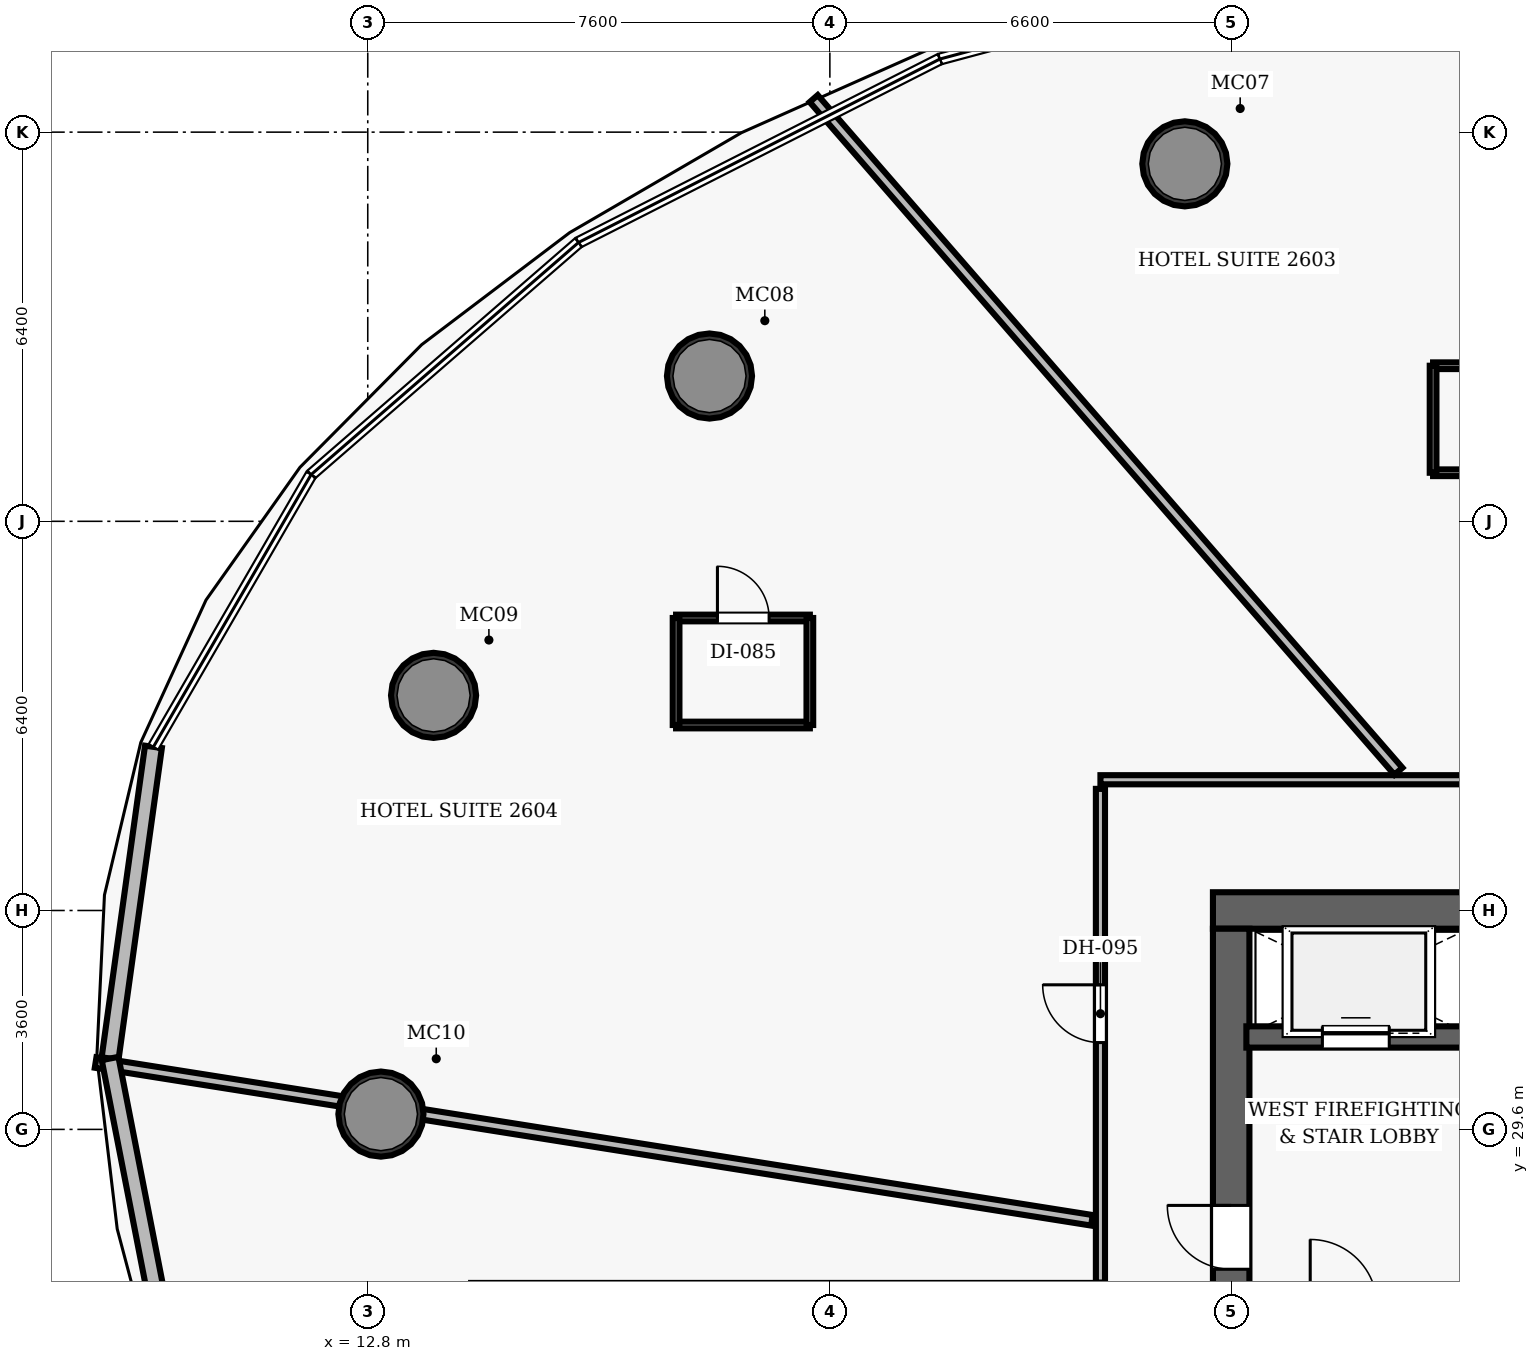
"""IFC4 building model, lengths in metres.
Left out: names, types, materials, properties, quantities, classifications, styles, units other than length and angle.
Written with IfcOpenShell. Run it as: python <this file> out.ifc"""

import sys

from ifc_helpers import new_model, si_unit, direction, frame, frame_2d, origin, origin_2d, place, context, subcontext, project, spatial, rectangle, hollow_circle, extrude, element, fill, save


model = new_model("IFC4")
c1 = context("Model", 3, precision=1e-05, world=origin(), true_north=direction((0.0, 1.0)))
c2 = subcontext(c1, "Body", "Model", "MODEL_VIEW")
j1 = project(units=[si_unit("LENGTHUNIT", "METRE"), si_unit("PLANEANGLEUNIT", "RADIAN")], contexts=[c1])
p1 = place(None, origin())
s1 = spatial("IfcSite", under=j1, at=p1, CompositionType="ELEMENT")
p2 = place(p1, origin())
s2 = spatial("IfcBuilding", under=s1, at=p2, CompositionType="ELEMENT")
p3 = place(p2, frame((0.0, 0.0, 109.8)))
s3 = spatial("IfcBuildingStorey", under=s2, at=p3, CompositionType="ELEMENT", Elevation=109.8)
p4 = place(p3, frame((26.7, 33.2, 0.0), z_axis=(0.0, 0.0, 1.0), x_axis=(1.0, 0.0, 0.0)))
e1 = element("IfcWall", 1, at=p4, inside=s3, PredefinedType="SHEAR", context=c2, shape_type="SweptSolid", body=[
    extrude(rectangle(XDim=22.6, YDim=0.6, at=frame_2d((11.3, 0.0))), origin(), (0.0, 0.0, 1.0), 3.5),
])
p5 = place(p4, frame((4.62, 0.0, 0.0)))
e2 = element("IfcOpeningElement", 2, at=p5, cuts=e1, PredefinedType="OPENING", context=c2, shape_type="SweptSolid", body=[
    extrude(rectangle(XDim=1.05, YDim=2.15, at=frame_2d((0.525, 1.075))), frame((0.0, 0.31, 0.0), z_axis=(0.0, -1.0, 0.0), x_axis=(1.0, 0.0, 0.0)), (0.0, 0.0, 1.0), 0.62),
])
p6 = place(p4, frame((14.52, 0.0, 0.0)))
e3 = element("IfcOpeningElement", 3, at=p6, cuts=e1, PredefinedType="OPENING", context=c2, shape_type="SweptSolid", body=[
    extrude(rectangle(XDim=1.05, YDim=2.15, at=frame_2d((0.525, 1.075))), frame((0.0, 0.31, 0.0), z_axis=(0.0, -1.0, 0.0), x_axis=(1.0, 0.0, 0.0)), (0.0, 0.0, 1.0), 0.62),
])
p7 = place(p3, frame((27.0, 19.1, 0.0), z_axis=(0.0, 0.0, 1.0), x_axis=(0.0, 1.0, 0.0)))
e4 = element("IfcWall", 4, at=p7, inside=s3, PredefinedType="SHEAR", context=c2, shape_type="SweptSolid", body=[
    extrude(rectangle(XDim=13.8, YDim=0.6, at=frame_2d((6.9, 0.0))), origin(), (0.0, 0.0, 1.0), 3.5),
])
p8 = place(p7, frame((8.2, 0.0, 0.0)))
e5 = element("IfcOpeningElement", 5, at=p8, cuts=e4, PredefinedType="OPENING", context=c2, shape_type="SweptSolid", body=[
    extrude(rectangle(XDim=1.05, YDim=2.15, at=frame_2d((0.525, 1.075))), frame((0.0, 0.31, 0.0), z_axis=(0.0, -1.0, 0.0), x_axis=(1.0, 0.0, 0.0)), (0.0, 0.0, 1.0), 0.62),
])
for number, where, z_axis, x_axis in (
    (6, (26.238, 45.479, 0.0), (0.0, 0.0, 1.0), (1.0, 0.0, 0.0)),
    (7, (18.42, 41.989, 0.0), (0.0, 0.0, 1.0), (1.0, 0.0, 0.0)),
    (8, (13.882, 36.738, 0.0), (0.0, 0.0, 1.0), (1.0, 0.0, 0.0)),
    (9, (13.016, 29.852, 0.0), (0.0, 0.0, 1.0), (1.0, 0.0, 0.0)),
):
    element("IfcColumn", number, at=place(p3, frame(where, z_axis=z_axis, x_axis=x_axis)), inside=s3, PredefinedType="COLUMN", context=c2, shape_type="SweptSolid", body=[
        extrude(hollow_circle(Radius=0.7, WallThickness=0.055, at=origin_2d()), origin(), (0.0, 0.0, 1.0), 3.5),
    ])
p9 = place(p3, frame((27.25, 31.12, 0.0), z_axis=(0.0, 0.0, 1.0), x_axis=(1.0, 0.0, 0.0)))
e10 = element("IfcWall", 10, at=p9, inside=s3, PredefinedType="SHEAR", context=c2, shape_type="SweptSolid", body=[
    extrude(rectangle(XDim=3.67, YDim=0.35, at=frame_2d((1.835, 0.0))), origin(), (0.0, 0.0, 1.0), 2.675),
])
p10 = place(p9, frame((1.25, 0.0, 0.0)))
e11 = element("IfcOpeningElement", 11, at=p10, cuts=e10, PredefinedType="OPENING", context=c2, shape_type="SweptSolid", body=[
    extrude(rectangle(XDim=1.1, YDim=2.15, at=frame_2d((0.55, 1.075))), frame((0.0, 0.185, 0.0), z_axis=(0.0, -1.0, 0.0), x_axis=(1.0, 0.0, 0.0)), (0.0, 0.0, 1.0), 0.37),
])
p11 = place(p3, frame((24.85, 35.35, 0.0), z_axis=(0.0, 0.0, 1.0), x_axis=(1.0, 0.0, 0.0)))
e12 = element("IfcWall", 12, at=p11, inside=s3, PredefinedType="PARTITIONING", context=c2, shape_type="SweptSolid", body=[
    extrude(rectangle(XDim=26.0, YDim=0.15, at=frame_2d((13.0, 0.0))), origin(), (0.0, 0.0, 1.0), 2.675),
])
p12 = place(p11, frame((14.325, 0.0, 0.0)))
e13 = element("IfcOpeningElement", 13, at=p12, cuts=e12, PredefinedType="OPENING", context=c2, shape_type="SweptSolid", body=[
    extrude(rectangle(XDim=0.95, YDim=2.15, at=frame_2d((0.475, 1.075))), frame((0.0, 0.085, 0.0), z_axis=(0.0, -1.0, 0.0), x_axis=(1.0, 0.0, 0.0)), (0.0, 0.0, 1.0), 0.17),
])
p13 = place(p11, frame((7.162, 0.0, 0.0)))
e14 = element("IfcOpeningElement", 14, at=p13, cuts=e12, PredefinedType="OPENING", context=c2, shape_type="SweptSolid", body=[
    extrude(rectangle(XDim=0.95, YDim=2.15, at=frame_2d((0.475, 1.075))), frame((0.0, 0.085, 0.0), z_axis=(0.0, -1.0, 0.0), x_axis=(1.0, 0.0, 0.0)), (0.0, 0.0, 1.0), 0.17),
])
p14 = place(p3, frame((24.85, 27.08, 0.0), z_axis=(0.0, 0.0, 1.0), x_axis=(0.0, 1.0, 0.0)))
e15 = element("IfcWall", 15, at=p14, inside=s3, PredefinedType="PARTITIONING", context=c2, shape_type="SweptSolid", body=[
    extrude(rectangle(XDim=8.12, YDim=0.15, at=frame_2d((4.06, 0.0))), origin(), (0.0, 0.0, 1.0), 2.675),
])
p15 = place(p14, frame((3.948, 0.0, 0.0)))
e16 = element("IfcOpeningElement", 16, at=p15, cuts=e15, PredefinedType="OPENING", context=c2, shape_type="SweptSolid", body=[
    extrude(rectangle(XDim=0.95, YDim=2.15, at=frame_2d((0.475, 1.075))), frame((0.0, 0.085, 0.0), z_axis=(0.0, -1.0, 0.0), x_axis=(1.0, 0.0, 0.0)), (0.0, 0.0, 1.0), 0.17),
])
p16 = place(p3, frame((29.75, 35.49, 0.0), z_axis=(0.0, 0.0, 1.0), x_axis=(-0.656055403937, 0.754712731419, 0.0)))
e17 = element("IfcWall", 17, at=p16, inside=s3, PredefinedType="PARTITIONING", context=c2, shape_type="SweptSolid", body=[
    extrude(rectangle(XDim=14.657, YDim=0.175, at=frame_2d((7.329, 0.0))), origin(), (0.0, 0.0, 1.0), 2.675),
])
p17 = place(p3, frame((24.71, 28.105, 0.0), z_axis=(0.0, 0.0, 1.0), x_axis=(-0.987688276275, 0.156434871144, 0.0)))
e18 = element("IfcWall", 18, at=p17, inside=s3, PredefinedType="PARTITIONING", context=c2, shape_type="SweptSolid", body=[
    extrude(rectangle(XDim=16.59, YDim=0.175, at=frame_2d((8.295, 0.0))), origin(), (0.0, 0.0, 1.0), 2.675),
])
p18 = place(p3, frame((30.321, 40.399, 0.0), z_axis=(0.0, 0.0, 1.0), x_axis=(1.0, 0.0, 0.0)))
e19 = element("IfcWall", 19, at=p18, inside=s3, PredefinedType="PARTITIONING", context=c2, shape_type="SweptSolid", body=[
    extrude(rectangle(XDim=2.2, YDim=0.11, at=frame_2d((1.1, 0.0))), origin(), (0.0, 0.0, 1.0), 2.675),
])
p19 = place(p3, frame((30.321, 42.159, 0.0), z_axis=(0.0, 0.0, 1.0), x_axis=(1.0, 0.0, 0.0)))
e20 = element("IfcWall", 20, at=p19, inside=s3, PredefinedType="PARTITIONING", context=c2, shape_type="SweptSolid", body=[
    extrude(rectangle(XDim=2.2, YDim=0.11, at=frame_2d((1.1, 0.0))), origin(), (0.0, 0.0, 1.0), 2.675),
])
p20 = place(p19, frame((0.68, 0.0, 0.0)))
e21 = element("IfcOpeningElement", 21, at=p20, cuts=e20, PredefinedType="OPENING", context=c2, shape_type="SweptSolid", body=[
    extrude(rectangle(XDim=0.85, YDim=2.1, at=frame_2d((0.425, 1.05))), frame((0.0, 0.065, 0.0), z_axis=(0.0, -1.0, 0.0), x_axis=(1.0, 0.0, 0.0)), (0.0, 0.0, 1.0), 0.13),
])
p21 = place(p3, frame((30.321, 40.399, 0.0), z_axis=(0.0, 0.0, 1.0), x_axis=(0.0, 1.0, 0.0)))
e22 = element("IfcWall", 22, at=p21, inside=s3, PredefinedType="PARTITIONING", context=c2, shape_type="SweptSolid", body=[
    extrude(rectangle(XDim=1.76, YDim=0.11, at=frame_2d((0.88, 0.0))), origin(), (0.0, 0.0, 1.0), 2.675),
])
p22 = place(p3, frame((17.871, 36.25, 0.0), z_axis=(0.0, 0.0, 1.0), x_axis=(1.0, 0.0, 0.0)))
e23 = element("IfcWall", 23, at=p22, inside=s3, PredefinedType="PARTITIONING", context=c2, shape_type="SweptSolid", body=[
    extrude(rectangle(XDim=2.2, YDim=0.11, at=frame_2d((1.1, 0.0))), origin(), (0.0, 0.0, 1.0), 2.675),
])
p23 = place(p3, frame((17.871, 38.01, 0.0), z_axis=(0.0, 0.0, 1.0), x_axis=(1.0, 0.0, 0.0)))
e24 = element("IfcWall", 24, at=p23, inside=s3, PredefinedType="PARTITIONING", context=c2, shape_type="SweptSolid", body=[
    extrude(rectangle(XDim=2.2, YDim=0.11, at=frame_2d((1.1, 0.0))), origin(), (0.0, 0.0, 1.0), 2.675),
])
p24 = place(p23, frame((0.68, 0.0, 0.0)))
e25 = element("IfcOpeningElement", 25, at=p24, cuts=e24, PredefinedType="OPENING", context=c2, shape_type="SweptSolid", body=[
    extrude(rectangle(XDim=0.85, YDim=2.1, at=frame_2d((0.425, 1.05))), frame((0.0, 0.065, 0.0), z_axis=(0.0, -1.0, 0.0), x_axis=(1.0, 0.0, 0.0)), (0.0, 0.0, 1.0), 0.13),
])
for number, where, z_axis, x_axis in (
    (26, (17.871, 36.25, 0.0), (0.0, 0.0, 1.0), (0.0, 1.0, 0.0)),
    (27, (20.071, 36.25, 0.0), (0.0, 0.0, 1.0), (0.0, 1.0, 0.0)),
):
    element("IfcWall", number, at=place(p3, frame(where, z_axis=z_axis, x_axis=x_axis)), inside=s3, PredefinedType="PARTITIONING", context=c2, shape_type="SweptSolid", body=[
        extrude(rectangle(XDim=1.76, YDim=0.11, at=frame_2d((0.88, 0.0))), origin(), (0.0, 0.0, 1.0), 2.675),
    ])
p25 = place(p3, frame((8.562, 30.766, 0.0), z_axis=(0.0, 0.0, 1.0), x_axis=(0.137820388365, 0.990457238123, 0.0)))
e28 = element("IfcWall", 28, at=p25, inside=s3, PredefinedType="SOLIDWALL", context=c2, shape_type="SweptSolid", body=[
    extrude(rectangle(XDim=5.174, YDim=0.28, at=frame_2d((2.587, 0.0))), origin(), (0.0, 0.0, 1.0), 3.26),
])
p26 = place(p3, frame((9.677, 25.051, 0.0), z_axis=(0.0, 0.0, 1.0), x_axis=(-0.191526121359, 0.981487516394, 0.0)))
e29 = element("IfcWall", 29, at=p26, inside=s3, PredefinedType="SOLIDWALL", context=c2, shape_type="SweptSolid", body=[
    extrude(rectangle(XDim=5.823, YDim=0.28, at=frame_2d((2.912, 0.0))), origin(), (0.0, 0.0, 1.0), 3.26),
])
p27 = place(p8, origin())
e30 = element("IfcDoor", 30, at=p27, inside=s3, OperationType="SINGLE_SWING_RIGHT", PredefinedType="DOOR", context=c2, shape_type="SweptSolid", body=[
    extrude(rectangle(XDim=1.05, YDim=2.15, at=frame_2d((0.525, 1.075))), frame((0.0, 0.025, 0.0), z_axis=(0.0, -1.0, 0.0), x_axis=(1.0, 0.0, 0.0)), (0.0, 0.0, 1.0), 0.05),
])
fill(e5, e30)
p28 = place(p15, origin())
e31 = element("IfcDoor", 31, at=p28, inside=s3, OperationType="SINGLE_SWING_RIGHT", PredefinedType="DOOR", context=c2, shape_type="SweptSolid", body=[
    extrude(rectangle(XDim=0.95, YDim=2.15, at=frame_2d((0.475, 1.075))), frame((0.0, 0.025, 0.0), z_axis=(0.0, -1.0, 0.0), x_axis=(1.0, 0.0, 0.0)), (0.0, 0.0, 1.0), 0.05),
])
fill(e16, e31)
p29 = place(p24, origin())
e32 = element("IfcDoor", 32, at=p29, inside=s3, OperationType="SINGLE_SWING_LEFT", PredefinedType="DOOR", context=c2, shape_type="SweptSolid", body=[
    extrude(rectangle(XDim=0.85, YDim=2.1, at=frame_2d((0.425, 1.05))), frame((0.0, 0.025, 0.0), z_axis=(0.0, -1.0, 0.0), x_axis=(1.0, 0.0, 0.0)), (0.0, 0.0, 1.0), 0.05),
])
fill(e25, e32)
p30 = place(p10, origin())
e33 = element("IfcDoor", 33, at=p30, inside=s3, OperationType="SLIDING_TO_LEFT", PredefinedType="DOOR", context=c2, shape_type="SweptSolid", body=[
    extrude(rectangle(XDim=1.1, YDim=2.15, at=frame_2d((0.55, 1.075))), frame((0.0, 0.025, 0.0), z_axis=(0.0, -1.0, 0.0), x_axis=(1.0, 0.0, 0.0)), (0.0, 0.0, 1.0), 0.05),
])
fill(e11, e33)
save(model, sys.argv[1])
